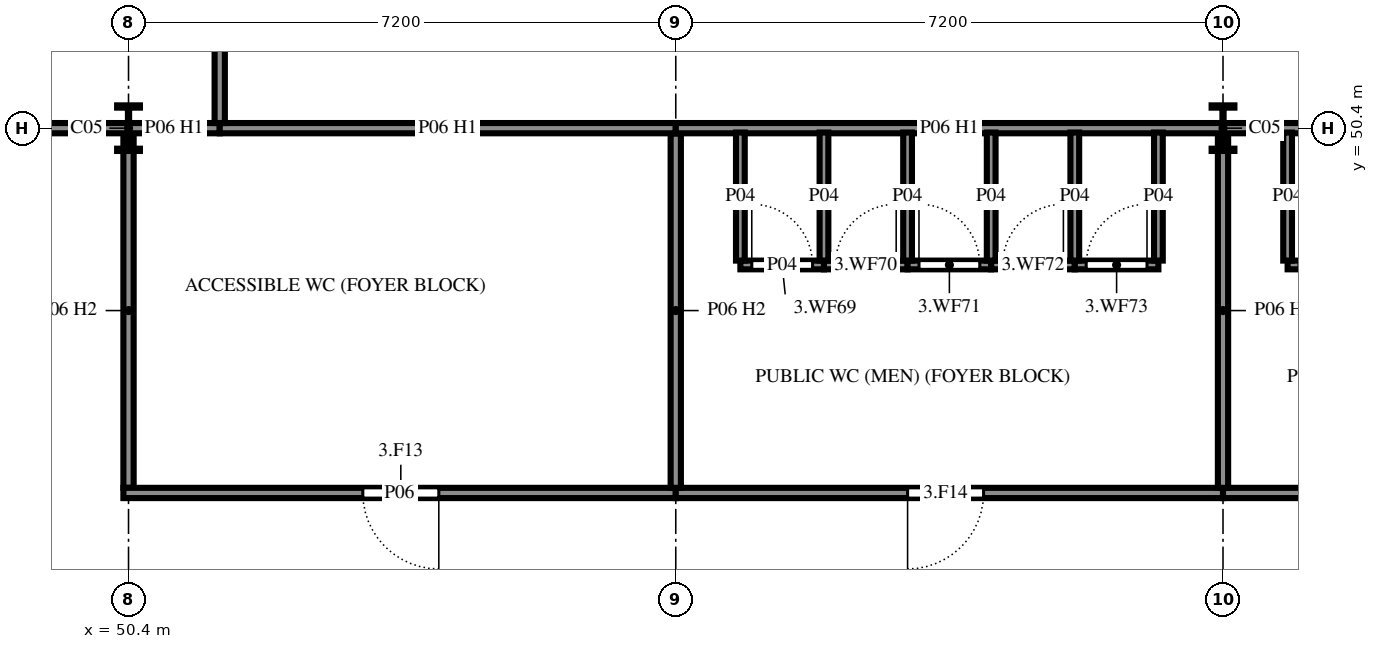
"""IFC4 building model, lengths in metres.
Left out: names, types, materials, properties, quantities, classifications, styles, units other than length and angle.
Written with IfcOpenShell. Run it as: python <this file> out.ifc"""

import sys

from ifc_helpers import new_model, si_unit, direction, frame, frame_2d, origin, origin_2d, place, context, subcontext, project, spatial, rectangle, i_section, extrude, element, fill, save


model = new_model("IFC4")
c1 = context("Model", 3, precision=1e-05, world=origin(), true_north=direction((0.0, 1.0)))
c2 = subcontext(c1, "Body", "Model", "MODEL_VIEW")
j1 = project(units=[si_unit("LENGTHUNIT", "METRE"), si_unit("PLANEANGLEUNIT", "RADIAN")], contexts=[c1])
p1 = place(None, origin())
s1 = spatial("IfcSite", under=j1, at=p1, CompositionType="ELEMENT")
p2 = place(p1, origin())
s2 = spatial("IfcBuilding", under=s1, at=p2, CompositionType="ELEMENT")
p3 = place(p2, frame((0.0, 0.0, 10.8)))
s3 = spatial("IfcBuildingStorey", under=s2, at=p3, CompositionType="ELEMENT", Elevation=10.8)
for number, where, z_axis, x_axis in (
    (1, (50.4, 50.4, 0.0), (0.0, 0.0, 1.0), (1.0, 0.0, 0.0)),
    (2, (64.8, 50.4, 0.0), (0.0, 0.0, 1.0), (1.0, 0.0, 0.0)),
):
    element("IfcColumn", number, at=place(p3, frame(where, z_axis=z_axis, x_axis=x_axis)), inside=s3, PredefinedType="COLUMN", context=c2, shape_type="SweptSolid", body=[
        extrude(i_section(OverallWidth=0.3, OverallDepth=0.6, WebThickness=0.015, FlangeThickness=0.03, FilletRadius=0.027, at=origin_2d()), origin(), (0.0, 0.0, 1.0), 3.6),
    ])
p4 = place(p3, frame((50.4, 50.333, 0.0), z_axis=(0.0, 0.0, 1.0), x_axis=(0.0, -1.0, 0.0)))
e3 = element("IfcWall", 3, at=p4, inside=s3, PredefinedType="PARTITIONING", context=c2, shape_type="SweptSolid", body=[
    extrude(rectangle(XDim=4.665, YDim=0.135, at=frame_2d((2.333, 0.0))), origin(), (0.0, 0.0, 1.0), 3.12),
])
p5 = place(p3, frame((36.0, 50.4, 0.0), z_axis=(0.0, 0.0, 1.0), x_axis=(1.0, 0.0, 0.0)))
e4 = element("IfcWall", 4, at=p5, inside=s3, PredefinedType="PARTITIONING", context=c2, shape_type="SweptSolid", body=[
    extrude(rectangle(XDim=14.4, YDim=0.135, at=frame_2d((7.2, 0.0))), origin(), (0.0, 0.0, 1.0), 2.82),
])
p6 = place(p3, frame((50.333, 45.6, 0.0), z_axis=(0.0, 0.0, 1.0), x_axis=(1.0, 0.0, 0.0)))
e5 = element("IfcWall", 5, at=p6, inside=s3, PredefinedType="PARTITIONING", context=c2, shape_type="SweptSolid", body=[
    extrude(rectangle(XDim=7.268, YDim=0.135, at=frame_2d((3.634, 0.0))), origin(), (0.0, 0.0, 1.0), 3.42),
])
p7 = place(p6, frame((3.15, 0.0, 0.0)))
e6 = element("IfcOpeningElement", 6, at=p7, cuts=e5, PredefinedType="OPENING", context=c2, shape_type="SweptSolid", body=[
    extrude(rectangle(XDim=1.0, YDim=2.4, at=frame_2d((0.5, 1.2))), frame((0.0, 0.077, 0.0), z_axis=(0.0, -1.0, 0.0), x_axis=(1.0, 0.0, 0.0)), (0.0, 0.0, 1.0), 0.155),
])
p8 = place(p3, frame((57.6, 45.6, 0.0), z_axis=(0.0, 0.0, 1.0), x_axis=(1.0, 0.0, 0.0)))
e7 = element("IfcWall", 7, at=p8, inside=s3, PredefinedType="PARTITIONING", context=c2, shape_type="SweptSolid", body=[
    extrude(rectangle(XDim=7.2, YDim=0.135, at=frame_2d((3.6, 0.0))), origin(), (0.0, 0.0, 1.0), 3.42),
])
p9 = place(p8, frame((3.05, 0.0, 0.0)))
e8 = element("IfcOpeningElement", 8, at=p9, cuts=e7, PredefinedType="OPENING", context=c2, shape_type="SweptSolid", body=[
    extrude(rectangle(XDim=1.0, YDim=2.4, at=frame_2d((0.5, 1.2))), frame((0.0, 0.077, 0.0), z_axis=(0.0, -1.0, 0.0), x_axis=(1.0, 0.0, 0.0)), (0.0, 0.0, 1.0), 0.155),
])
p10 = place(p3, frame((64.8, 45.6, 0.0), z_axis=(0.0, 0.0, 1.0), x_axis=(1.0, 0.0, 0.0)))
e9 = element("IfcWall", 9, at=p10, inside=s3, PredefinedType="PARTITIONING", context=c2, shape_type="SweptSolid", body=[
    extrude(rectangle(XDim=7.267, YDim=0.135, at=frame_2d((3.634, 0.0))), origin(), (0.0, 0.0, 1.0), 3.42),
])
p11 = place(p10, frame((3.15, 0.0, 0.0)))
e10 = element("IfcOpeningElement", 10, at=p11, cuts=e9, PredefinedType="OPENING", context=c2, shape_type="SweptSolid", body=[
    extrude(rectangle(XDim=1.0, YDim=2.4, at=frame_2d((0.5, 1.2))), frame((0.0, 0.077, 0.0), z_axis=(0.0, -1.0, 0.0), x_axis=(1.0, 0.0, 0.0)), (0.0, 0.0, 1.0), 0.155),
])
p12 = place(p3, frame((57.6, 50.333, 0.0), z_axis=(0.0, 0.0, 1.0), x_axis=(0.0, -1.0, 0.0)))
e11 = element("IfcWall", 11, at=p12, inside=s3, PredefinedType="PARTITIONING", context=c2, shape_type="SweptSolid", body=[
    extrude(rectangle(XDim=4.665, YDim=0.135, at=frame_2d((2.333, 0.0))), origin(), (0.0, 0.0, 1.0), 3.12),
])
p13 = place(p3, frame((50.4, 50.4, 0.0), z_axis=(0.0, 0.0, 1.0), x_axis=(1.0, 0.0, 0.0)))
e12 = element("IfcWall", 12, at=p13, inside=s3, PredefinedType="PARTITIONING", context=c2, shape_type="SweptSolid", body=[
    extrude(rectangle(XDim=1.2, YDim=0.135, at=frame_2d((0.6, 0.0))), origin(), (0.0, 0.0, 1.0), 2.82),
])
p14 = place(p3, frame((51.6, 50.4, 0.0), z_axis=(0.0, 0.0, 1.0), x_axis=(1.0, 0.0, 0.0)))
e13 = element("IfcWall", 13, at=p14, inside=s3, PredefinedType="PARTITIONING", context=c2, shape_type="SweptSolid", body=[
    extrude(rectangle(XDim=6.0, YDim=0.135, at=frame_2d((3.0, 0.0))), origin(), (0.0, 0.0, 1.0), 2.82),
])
p15 = place(p3, frame((64.8, 50.333, 0.0), z_axis=(0.0, 0.0, 1.0), x_axis=(0.0, -1.0, 0.0)))
e14 = element("IfcWall", 14, at=p15, inside=s3, PredefinedType="PARTITIONING", context=c2, shape_type="SweptSolid", body=[
    extrude(rectangle(XDim=4.665, YDim=0.135, at=frame_2d((2.333, 0.0))), origin(), (0.0, 0.0, 1.0), 3.12),
])
p16 = place(p3, frame((57.6, 50.4, 0.0), z_axis=(0.0, 0.0, 1.0), x_axis=(1.0, 0.0, 0.0)))
e15 = element("IfcWall", 15, at=p16, inside=s3, PredefinedType="PARTITIONING", context=c2, shape_type="SweptSolid", body=[
    extrude(rectangle(XDim=7.2, YDim=0.135, at=frame_2d((3.6, 0.0))), origin(), (0.0, 0.0, 1.0), 2.82),
])
p17 = place(p3, frame((64.8, 50.4, 0.0), z_axis=(0.0, 0.0, 1.0), x_axis=(1.0, 0.0, 0.0)))
e16 = element("IfcWall", 16, at=p17, inside=s3, PredefinedType="PARTITIONING", context=c2, shape_type="SweptSolid", body=[
    extrude(rectangle(XDim=3.415, YDim=0.135, at=frame_2d((1.708, 0.0))), origin(), (0.0, 0.0, 1.0), 3.22),
])
p18 = place(p3, frame((51.6, 58.133, 0.0), z_axis=(0.0, 0.0, 1.0), x_axis=(0.0, -1.0, 0.0)))
e17 = element("IfcWall", 17, at=p18, inside=s3, PredefinedType="PARTITIONING", context=c2, shape_type="SweptSolid", body=[
    extrude(rectangle(XDim=7.665, YDim=0.135, at=frame_2d((3.833, 0.0))), origin(), (0.0, 0.0, 1.0), 3.42),
])
p19 = place(p3, frame((58.45, 48.6, 0.0), z_axis=(0.0, 0.0, 1.0), x_axis=(1.0, 0.0, 0.0)))
e18 = element("IfcWall", 18, at=p19, inside=s3, PredefinedType="PARTITIONING", context=c2, shape_type="SweptSolid", body=[
    extrude(rectangle(XDim=1.1, YDim=0.115, at=frame_2d((0.55, 0.0))), origin(), (0.0, 0.0, 1.0), 3.42),
])
p20 = place(p19, frame((0.15, 0.0, 0.0)))
e19 = element("IfcOpeningElement", 19, at=p20, cuts=e18, PredefinedType="OPENING", context=c2, shape_type="SweptSolid", body=[
    extrude(rectangle(XDim=0.8, YDim=2.1, at=frame_2d((0.4, 1.05))), frame((0.0, 0.067, 0.0), z_axis=(0.0, -1.0, 0.0), x_axis=(1.0, 0.0, 0.0)), (0.0, 0.0, 1.0), 0.135),
])
p21 = place(p3, frame((58.45, 50.343, 0.0), z_axis=(0.0, 0.0, 1.0), x_axis=(0.0, -1.0, 0.0)))
e20 = element("IfcWall", 20, at=p21, inside=s3, PredefinedType="PARTITIONING", context=c2, shape_type="SweptSolid", body=[
    extrude(rectangle(XDim=1.685, YDim=0.115, at=frame_2d((0.843, 0.0))), origin(), (0.0, 0.0, 1.0), 3.42),
])
p22 = place(p3, frame((59.55, 48.6, 0.0), z_axis=(0.0, 0.0, 1.0), x_axis=(1.0, 0.0, 0.0)))
e21 = element("IfcWall", 21, at=p22, inside=s3, PredefinedType="PARTITIONING", context=c2, shape_type="SweptSolid", body=[
    extrude(rectangle(XDim=1.1, YDim=0.115, at=frame_2d((0.55, 0.0))), origin(), (0.0, 0.0, 1.0), 3.42),
])
p23 = place(p22, frame((0.15, 0.0, 0.0)))
e22 = element("IfcOpeningElement", 22, at=p23, cuts=e21, PredefinedType="OPENING", context=c2, shape_type="SweptSolid", body=[
    extrude(rectangle(XDim=0.8, YDim=2.1, at=frame_2d((0.4, 1.05))), frame((0.0, 0.067, 0.0), z_axis=(0.0, -1.0, 0.0), x_axis=(1.0, 0.0, 0.0)), (0.0, 0.0, 1.0), 0.135),
])
p24 = place(p3, frame((59.55, 50.343, 0.0), z_axis=(0.0, 0.0, 1.0), x_axis=(0.0, -1.0, 0.0)))
e23 = element("IfcWall", 23, at=p24, inside=s3, PredefinedType="PARTITIONING", context=c2, shape_type="SweptSolid", body=[
    extrude(rectangle(XDim=1.685, YDim=0.115, at=frame_2d((0.843, 0.0))), origin(), (0.0, 0.0, 1.0), 3.42),
])
p25 = place(p3, frame((60.65, 48.6, 0.0), z_axis=(0.0, 0.0, 1.0), x_axis=(1.0, 0.0, 0.0)))
e24 = element("IfcWall", 24, at=p25, inside=s3, PredefinedType="PARTITIONING", context=c2, shape_type="SweptSolid", body=[
    extrude(rectangle(XDim=1.1, YDim=0.115, at=frame_2d((0.55, 0.0))), origin(), (0.0, 0.0, 1.0), 3.42),
])
p26 = place(p25, frame((0.15, 0.0, 0.0)))
e25 = element("IfcOpeningElement", 25, at=p26, cuts=e24, PredefinedType="OPENING", context=c2, shape_type="SweptSolid", body=[
    extrude(rectangle(XDim=0.8, YDim=2.1, at=frame_2d((0.4, 1.05))), frame((0.0, 0.067, 0.0), z_axis=(0.0, -1.0, 0.0), x_axis=(1.0, 0.0, 0.0)), (0.0, 0.0, 1.0), 0.135),
])
p27 = place(p3, frame((60.65, 50.343, 0.0), z_axis=(0.0, 0.0, 1.0), x_axis=(0.0, -1.0, 0.0)))
e26 = element("IfcWall", 26, at=p27, inside=s3, PredefinedType="PARTITIONING", context=c2, shape_type="SweptSolid", body=[
    extrude(rectangle(XDim=1.685, YDim=0.115, at=frame_2d((0.843, 0.0))), origin(), (0.0, 0.0, 1.0), 3.42),
])
p28 = place(p3, frame((61.75, 48.6, 0.0), z_axis=(0.0, 0.0, 1.0), x_axis=(1.0, 0.0, 0.0)))
e27 = element("IfcWall", 27, at=p28, inside=s3, PredefinedType="PARTITIONING", context=c2, shape_type="SweptSolid", body=[
    extrude(rectangle(XDim=1.1, YDim=0.115, at=frame_2d((0.55, 0.0))), origin(), (0.0, 0.0, 1.0), 3.42),
])
p29 = place(p28, frame((0.15, 0.0, 0.0)))
e28 = element("IfcOpeningElement", 28, at=p29, cuts=e27, PredefinedType="OPENING", context=c2, shape_type="SweptSolid", body=[
    extrude(rectangle(XDim=0.8, YDim=2.1, at=frame_2d((0.4, 1.05))), frame((0.0, 0.067, 0.0), z_axis=(0.0, -1.0, 0.0), x_axis=(1.0, 0.0, 0.0)), (0.0, 0.0, 1.0), 0.135),
])
p30 = place(p3, frame((61.75, 50.343, 0.0), z_axis=(0.0, 0.0, 1.0), x_axis=(0.0, -1.0, 0.0)))
e29 = element("IfcWall", 29, at=p30, inside=s3, PredefinedType="PARTITIONING", context=c2, shape_type="SweptSolid", body=[
    extrude(rectangle(XDim=1.685, YDim=0.115, at=frame_2d((0.843, 0.0))), origin(), (0.0, 0.0, 1.0), 3.42),
])
p31 = place(p3, frame((62.85, 48.6, 0.0), z_axis=(0.0, 0.0, 1.0), x_axis=(1.0, 0.0, 0.0)))
e30 = element("IfcWall", 30, at=p31, inside=s3, PredefinedType="PARTITIONING", context=c2, shape_type="SweptSolid", body=[
    extrude(rectangle(XDim=1.1, YDim=0.115, at=frame_2d((0.55, 0.0))), origin(), (0.0, 0.0, 1.0), 3.42),
])
p32 = place(p31, frame((0.15, 0.0, 0.0)))
e31 = element("IfcOpeningElement", 31, at=p32, cuts=e30, PredefinedType="OPENING", context=c2, shape_type="SweptSolid", body=[
    extrude(rectangle(XDim=0.8, YDim=2.1, at=frame_2d((0.4, 1.05))), frame((0.0, 0.067, 0.0), z_axis=(0.0, -1.0, 0.0), x_axis=(1.0, 0.0, 0.0)), (0.0, 0.0, 1.0), 0.135),
])
for number, where, z_axis, x_axis in (
    (32, (62.85, 50.343, 0.0), (0.0, 0.0, 1.0), (0.0, -1.0, 0.0)),
    (33, (63.95, 50.343, 0.0), (0.0, 0.0, 1.0), (0.0, -1.0, 0.0)),
):
    element("IfcWall", number, at=place(p3, frame(where, z_axis=z_axis, x_axis=x_axis)), inside=s3, PredefinedType="PARTITIONING", context=c2, shape_type="SweptSolid", body=[
        extrude(rectangle(XDim=1.685, YDim=0.115, at=frame_2d((0.843, 0.0))), origin(), (0.0, 0.0, 1.0), 3.42),
    ])
p33 = place(p3, frame((65.65, 48.6, 0.0), z_axis=(0.0, 0.0, 1.0), x_axis=(1.0, 0.0, 0.0)))
e34 = element("IfcWall", 34, at=p33, inside=s3, PredefinedType="PARTITIONING", context=c2, shape_type="SweptSolid", body=[
    extrude(rectangle(XDim=1.1, YDim=0.115, at=frame_2d((0.55, 0.0))), origin(), (0.0, 0.0, 1.0), 3.42),
])
p34 = place(p33, frame((0.15, 0.0, 0.0)))
e35 = element("IfcOpeningElement", 35, at=p34, cuts=e34, PredefinedType="OPENING", context=c2, shape_type="SweptSolid", body=[
    extrude(rectangle(XDim=0.8, YDim=2.1, at=frame_2d((0.4, 1.05))), frame((0.0, 0.067, 0.0), z_axis=(0.0, -1.0, 0.0), x_axis=(1.0, 0.0, 0.0)), (0.0, 0.0, 1.0), 0.135),
])
p35 = place(p3, frame((65.65, 50.343, 0.0), z_axis=(0.0, 0.0, 1.0), x_axis=(0.0, -1.0, 0.0)))
e36 = element("IfcWall", 36, at=p35, inside=s3, PredefinedType="PARTITIONING", context=c2, shape_type="SweptSolid", body=[
    extrude(rectangle(XDim=1.685, YDim=0.115, at=frame_2d((0.843, 0.0))), origin(), (0.0, 0.0, 1.0), 3.42),
])
p36 = place(p7, frame((1.0, 0.0, 0.0), z_axis=(0.0, 0.0, 1.0), x_axis=(-1.0, 0.0, 0.0)))
e37 = element("IfcDoor", 37, at=p36, inside=s3, OperationType="SINGLE_SWING_RIGHT", PredefinedType="DOOR", context=c2, shape_type="SweptSolid", body=[
    extrude(rectangle(XDim=1.0, YDim=2.4, at=frame_2d((0.5, 1.2))), frame((0.0, 0.025, 0.0), z_axis=(0.0, -1.0, 0.0), x_axis=(1.0, 0.0, 0.0)), (0.0, 0.0, 1.0), 0.05),
])
fill(e6, e37)
p37 = place(p9, frame((1.0, 0.0, 0.0), z_axis=(0.0, 0.0, 1.0), x_axis=(-1.0, 0.0, 0.0)))
e38 = element("IfcDoor", 38, at=p37, inside=s3, OperationType="SINGLE_SWING_LEFT", PredefinedType="DOOR", context=c2, shape_type="SweptSolid", body=[
    extrude(rectangle(XDim=1.0, YDim=2.4, at=frame_2d((0.5, 1.2))), frame((0.0, 0.025, 0.0), z_axis=(0.0, -1.0, 0.0), x_axis=(1.0, 0.0, 0.0)), (0.0, 0.0, 1.0), 0.05),
])
fill(e8, e38)
p38 = place(p20, origin())
e39 = element("IfcDoor", 39, at=p38, inside=s3, OperationType="SINGLE_SWING_RIGHT", PredefinedType="DOOR", context=c2, shape_type="SweptSolid", body=[
    extrude(rectangle(XDim=0.8, YDim=2.1, at=frame_2d((0.4, 1.05))), frame((0.0, 0.025, 0.0), z_axis=(0.0, -1.0, 0.0), x_axis=(1.0, 0.0, 0.0)), (0.0, 0.0, 1.0), 0.05),
])
fill(e19, e39)
p39 = place(p23, origin())
e40 = element("IfcDoor", 40, at=p39, inside=s3, OperationType="SINGLE_SWING_LEFT", PredefinedType="DOOR", context=c2, shape_type="SweptSolid", body=[
    extrude(rectangle(XDim=0.8, YDim=2.1, at=frame_2d((0.4, 1.05))), frame((0.0, 0.025, 0.0), z_axis=(0.0, -1.0, 0.0), x_axis=(1.0, 0.0, 0.0)), (0.0, 0.0, 1.0), 0.05),
])
fill(e22, e40)
p40 = place(p26, origin())
e41 = element("IfcDoor", 41, at=p40, inside=s3, OperationType="SINGLE_SWING_RIGHT", PredefinedType="DOOR", context=c2, shape_type="SweptSolid", body=[
    extrude(rectangle(XDim=0.8, YDim=2.1, at=frame_2d((0.4, 1.05))), frame((0.0, 0.025, 0.0), z_axis=(0.0, -1.0, 0.0), x_axis=(1.0, 0.0, 0.0)), (0.0, 0.0, 1.0), 0.05),
])
fill(e25, e41)
p41 = place(p29, origin())
e42 = element("IfcDoor", 42, at=p41, inside=s3, OperationType="SINGLE_SWING_LEFT", PredefinedType="DOOR", context=c2, shape_type="SweptSolid", body=[
    extrude(rectangle(XDim=0.8, YDim=2.1, at=frame_2d((0.4, 1.05))), frame((0.0, 0.025, 0.0), z_axis=(0.0, -1.0, 0.0), x_axis=(1.0, 0.0, 0.0)), (0.0, 0.0, 1.0), 0.05),
])
fill(e28, e42)
p42 = place(p32, origin())
e43 = element("IfcDoor", 43, at=p42, inside=s3, OperationType="SINGLE_SWING_LEFT", PredefinedType="DOOR", context=c2, shape_type="SweptSolid", body=[
    extrude(rectangle(XDim=0.8, YDim=2.1, at=frame_2d((0.4, 1.05))), frame((0.0, 0.025, 0.0), z_axis=(0.0, -1.0, 0.0), x_axis=(1.0, 0.0, 0.0)), (0.0, 0.0, 1.0), 0.05),
])
fill(e31, e43)
p43 = place(p34, origin())
e44 = element("IfcDoor", 44, at=p43, inside=s3, OperationType="SINGLE_SWING_LEFT", PredefinedType="DOOR", context=c2, shape_type="SweptSolid", body=[
    extrude(rectangle(XDim=0.8, YDim=2.1, at=frame_2d((0.4, 1.05))), frame((0.0, 0.025, 0.0), z_axis=(0.0, -1.0, 0.0), x_axis=(1.0, 0.0, 0.0)), (0.0, 0.0, 1.0), 0.05),
])
fill(e35, e44)
save(model, sys.argv[1])
